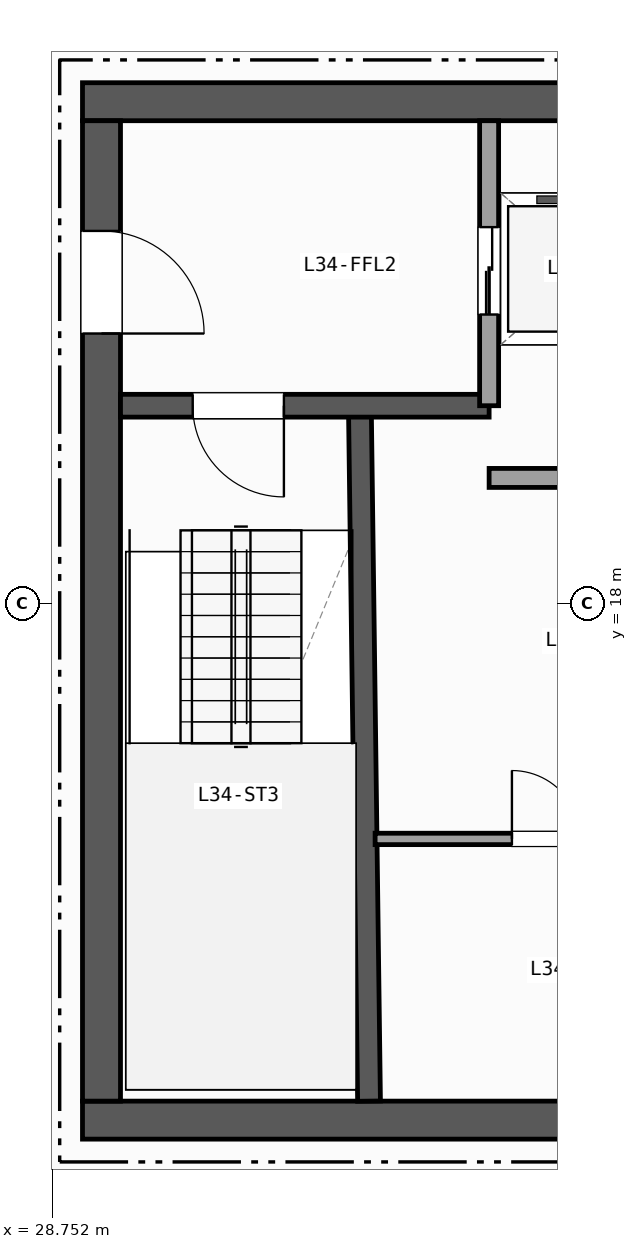
"""IFC4 building model, lengths in metres.
Left out: names, types, materials, properties, quantities, classifications, styles, units other than length and angle.
Written with IfcOpenShell. Run it as: python <this file> out.ifc"""

import sys

from ifc_helpers import new_model, si_unit, direction, frame, frame_2d, origin, place, context, subcontext, project, spatial, rectangle, extrude, element, fill, save


model = new_model("IFC4")
c1 = context("Model", 3, precision=1e-05, world=origin(), true_north=direction((0.0, 1.0)))
c2 = subcontext(c1, "Body", "Model", "MODEL_VIEW")
j1 = project(units=[si_unit("LENGTHUNIT", "METRE"), si_unit("PLANEANGLEUNIT", "RADIAN")], contexts=[c1])
p1 = place(None, origin())
s1 = spatial("IfcSite", under=j1, at=p1, CompositionType="ELEMENT")
p2 = place(p1, origin())
s2 = spatial("IfcBuilding", under=s1, at=p2, CompositionType="ELEMENT")
p3 = place(p2, frame((0.0, 0.0, 139.6)))
s3 = spatial("IfcBuildingStorey", under=s2, at=p3, CompositionType="ELEMENT", Elevation=139.6)
p4 = place(p3, frame((29.15, 11.2, 0.0), z_axis=(0.0, 0.0, 1.0), x_axis=(1.0, 0.0, 0.0)))
e1 = element("IfcWall", 1, at=p4, inside=s3, PredefinedType="SHEAR", context=c2, shape_type="SweptSolid", body=[
    extrude(rectangle(XDim=13.9, YDim=0.5, at=frame_2d((6.95, 0.0))), origin(), (0.0, 0.0, 1.0), 3.42),
])
p5 = place(p3, frame((43.05, 24.6, 0.0), z_axis=(0.0, 0.0, 1.0), x_axis=(-1.0, 0.0, 0.0)))
e2 = element("IfcWall", 2, at=p5, inside=s3, PredefinedType="SHEAR", context=c2, shape_type="SweptSolid", body=[
    extrude(rectangle(XDim=13.9, YDim=0.5, at=frame_2d((6.95, 0.0))), origin(), (0.0, 0.0, 1.0), 3.42),
])
p6 = place(p5, frame((0.75, 0.0, 0.0)))
e3 = element("IfcOpeningElement", 3, at=p6, cuts=e2, PredefinedType="OPENING", context=c2, shape_type="SweptSolid", body=[
    extrude(rectangle(XDim=1.1, YDim=2.15, at=frame_2d((0.55, 1.075))), frame((0.0, 0.26, 0.0), z_axis=(0.0, -1.0, 0.0), x_axis=(1.0, 0.0, 0.0)), (0.0, 0.0, 1.0), 0.52),
])
p7 = place(p5, frame((2.7, 0.0, 0.0)))
e4 = element("IfcOpeningElement", 4, at=p7, cuts=e2, PredefinedType="OPENING", context=c2, shape_type="SweptSolid", body=[
    extrude(rectangle(XDim=0.9, YDim=2.1, at=frame_2d((0.45, 1.05))), frame((0.0, 0.26, 0.0), z_axis=(0.0, -1.0, 0.0), x_axis=(1.0, 0.0, 0.0)), (0.0, 0.0, 1.0), 0.52),
])
p8 = place(p5, frame((4.6, 0.0, 0.0)))
e5 = element("IfcOpeningElement", 5, at=p8, cuts=e2, PredefinedType="OPENING", context=c2, shape_type="SweptSolid", body=[
    extrude(rectangle(XDim=0.9, YDim=2.1, at=frame_2d((0.45, 1.05))), frame((0.0, 0.26, 0.0), z_axis=(0.0, -1.0, 0.0), x_axis=(1.0, 0.0, 0.0)), (0.0, 0.0, 1.0), 0.52),
])
p9 = place(p3, frame((29.4, 24.35, 0.0), z_axis=(0.0, 0.0, 1.0), x_axis=(0.0, -1.0, 0.0)))
e6 = element("IfcWall", 6, at=p9, inside=s3, PredefinedType="SHEAR", context=c2, shape_type="SweptSolid", body=[
    extrude(rectangle(XDim=12.9, YDim=0.5, at=frame_2d((6.45, 0.0))), origin(), (0.0, 0.0, 1.0), 3.42),
])
p10 = place(p9, frame((1.45, 0.0, 0.0)))
e7 = element("IfcOpeningElement", 7, at=p10, cuts=e6, PredefinedType="OPENING", context=c2, shape_type="SweptSolid", body=[
    extrude(rectangle(XDim=1.35, YDim=2.15, at=frame_2d((0.675, 1.075))), frame((0.0, 0.26, 0.0), z_axis=(0.0, -1.0, 0.0), x_axis=(1.0, 0.0, 0.0)), (0.0, 0.0, 1.0), 0.52),
])
p11 = place(p3, frame((32.92, 11.45, 0.0), z_axis=(0.0, 0.0, 1.0), x_axis=(-0.013171578211, 0.999913251001, 0.0)))
e8 = element("IfcWall", 8, at=p11, inside=s3, PredefinedType="SHEAR", context=c2, shape_type="SweptSolid", body=[
    extrude(rectangle(XDim=9.101, YDim=0.3, at=frame_2d((4.55, 0.0))), origin(), (0.0, 0.0, 1.0), 3.42),
])
p12 = place(p3, frame((34.5, 20.6, 0.0), z_axis=(0.0, 0.0, 1.0), x_axis=(-1.0, 0.0, 0.0)))
e9 = element("IfcWall", 9, at=p12, inside=s3, PredefinedType="SHEAR", context=c2, shape_type="SweptSolid", body=[
    extrude(rectangle(XDim=4.85, YDim=0.3, at=frame_2d((2.425, 0.0))), origin(), (0.0, 0.0, 1.0), 3.42),
])
p13 = place(p12, frame((2.7, 0.0, 0.0)))
e10 = element("IfcOpeningElement", 10, at=p13, cuts=e9, PredefinedType="OPENING", context=c2, shape_type="SweptSolid", body=[
    extrude(rectangle(XDim=1.2, YDim=2.15, at=frame_2d((0.6, 1.075))), frame((0.0, 0.16, 0.0), z_axis=(0.0, -1.0, 0.0), x_axis=(1.0, 0.0, 0.0)), (0.0, 0.0, 1.0), 0.32),
])
p14 = place(p3, frame((34.5, 20.6, 0.0), z_axis=(0.0, 0.0, 1.0), x_axis=(0.0, 1.0, 0.0)))
e11 = element("IfcWall", 11, at=p14, inside=s3, PredefinedType="PARTITIONING", context=c2, shape_type="SweptSolid", body=[
    extrude(rectangle(XDim=3.75, YDim=0.25, at=frame_2d((1.875, 0.0))), origin(), (0.0, 0.0, 1.0), 3.42),
])
p15 = place(p14, frame((1.2, 0.0, 0.0)))
e12 = element("IfcOpeningElement", 12, at=p15, cuts=e11, PredefinedType="OPENING", context=c2, shape_type="SweptSolid", body=[
    extrude(rectangle(XDim=1.15, YDim=2.15, at=frame_2d((0.575, 1.075))), frame((0.0, 0.135, 0.0), z_axis=(0.0, -1.0, 0.0), x_axis=(1.0, 0.0, 0.0)), (0.0, 0.0, 1.0), 0.27),
])
p16 = place(p3, frame((34.5, 19.65, 0.0), z_axis=(0.0, 0.0, 1.0), x_axis=(1.0, 0.0, 0.0)))
e13 = element("IfcWall", 13, at=p16, inside=s3, PredefinedType="PARTITIONING", context=c2, shape_type="SweptSolid", body=[
    extrude(rectangle(XDim=6.48, YDim=0.25, at=frame_2d((3.24, 0.0))), origin(), (0.0, 0.0, 1.0), 3.42),
])
p17 = place(p3, frame((33.0, 14.9, 0.0), z_axis=(0.0, 0.0, 1.0), x_axis=(1.0, 0.0, 0.0)))
e14 = element("IfcWall", 14, at=p17, inside=s3, PredefinedType="PARTITIONING", context=c2, shape_type="SweptSolid", body=[
    extrude(rectangle(XDim=5.1, YDim=0.15, at=frame_2d((2.55, 0.0))), origin(), (0.0, 0.0, 1.0), 3.42),
])
p18 = place(p17, frame((1.8, 0.0, 0.0)))
e15 = element("IfcOpeningElement", 15, at=p18, cuts=e14, PredefinedType="OPENING", context=c2, shape_type="SweptSolid", body=[
    extrude(rectangle(XDim=0.9, YDim=2.1, at=frame_2d((0.45, 1.05))), frame((0.0, 0.085, 0.0), z_axis=(0.0, -1.0, 0.0), x_axis=(1.0, 0.0, 0.0)), (0.0, 0.0, 1.0), 0.17),
])
p19 = place(p13, origin())
e16 = element("IfcDoor", 16, at=p19, inside=s3, OperationType="SINGLE_SWING_LEFT", PredefinedType="DOOR", context=c2, shape_type="SweptSolid", body=[
    extrude(rectangle(XDim=1.2, YDim=2.15, at=frame_2d((0.6, 1.075))), frame((0.0, 0.025, 0.0), z_axis=(0.0, -1.0, 0.0), x_axis=(1.0, 0.0, 0.0)), (0.0, 0.0, 1.0), 0.05),
])
fill(e10, e16)
p20 = place(p10, origin())
e17 = element("IfcDoor", 17, at=p20, inside=s3, OperationType="SINGLE_SWING_RIGHT", PredefinedType="DOOR", context=c2, shape_type="SweptSolid", body=[
    extrude(rectangle(XDim=1.35, YDim=2.15, at=frame_2d((0.675, 1.075))), frame((0.0, 0.025, 0.0), z_axis=(0.0, -1.0, 0.0), x_axis=(1.0, 0.0, 0.0)), (0.0, 0.0, 1.0), 0.05),
])
fill(e7, e17)
p21 = place(p15, origin())
e18 = element("IfcDoor", 18, at=p21, inside=s3, OperationType="DOUBLE_DOOR_SLIDING", PredefinedType="DOOR", context=c2, shape_type="SweptSolid", body=[
    extrude(rectangle(XDim=1.15, YDim=2.15, at=frame_2d((0.575, 1.075))), frame((0.0, 0.025, 0.0), z_axis=(0.0, -1.0, 0.0), x_axis=(1.0, 0.0, 0.0)), (0.0, 0.0, 1.0), 0.05),
])
fill(e12, e18)
p22 = place(p18, origin())
e19 = element("IfcDoor", 19, at=p22, inside=s3, OperationType="SINGLE_SWING_LEFT", PredefinedType="DOOR", context=c2, shape_type="SweptSolid", body=[
    extrude(rectangle(XDim=0.9, YDim=2.1, at=frame_2d((0.45, 1.05))), frame((0.0, 0.025, 0.0), z_axis=(0.0, -1.0, 0.0), x_axis=(1.0, 0.0, 0.0)), (0.0, 0.0, 1.0), 0.05),
])
fill(e15, e19)
save(model, sys.argv[1])
